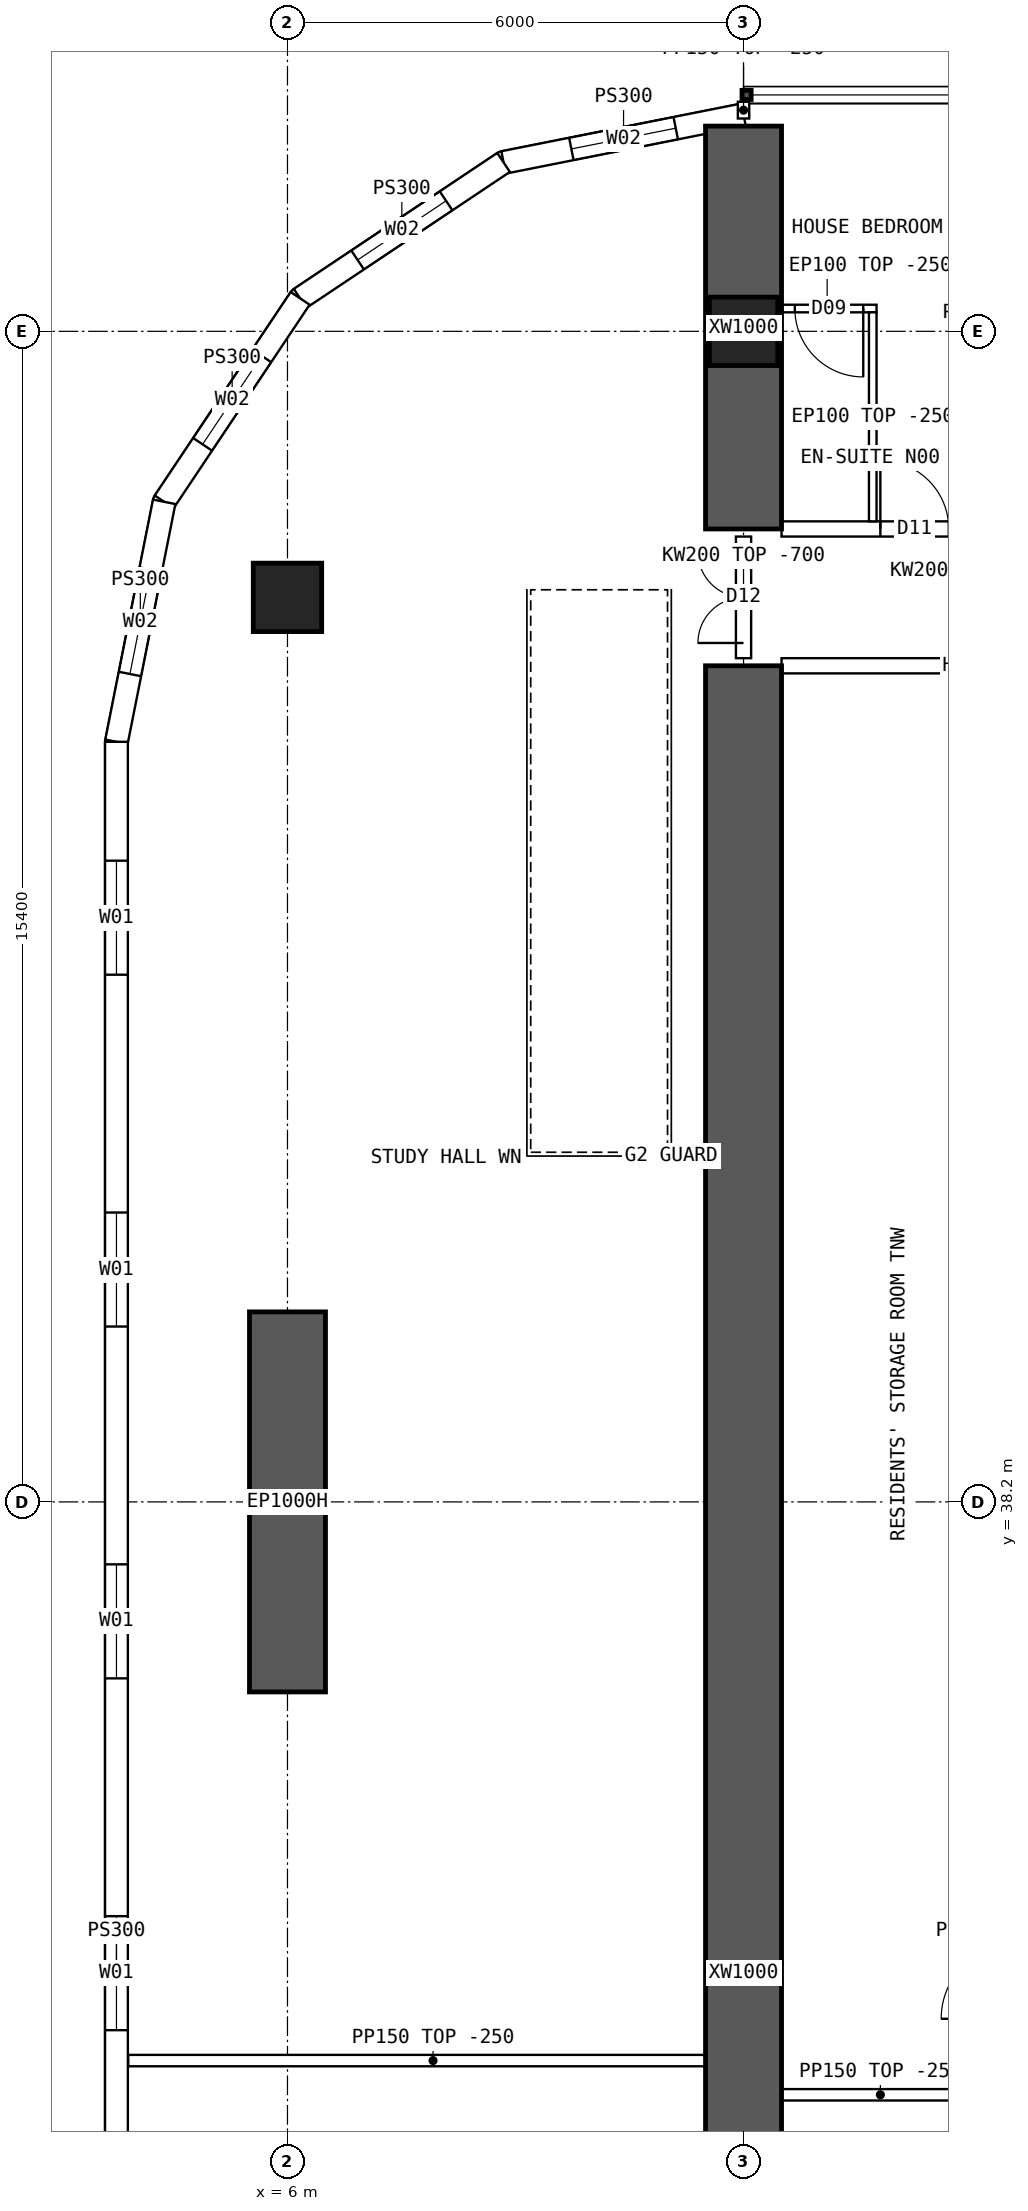
"""IFC4 building model, lengths in metres.
Left out: names, types, materials, properties, quantities, classifications, styles, units other than length and angle.
Written with IfcOpenShell. Run it as: python <this file> out.ifc"""

import sys

from ifc_helpers import new_model, si_unit, direction, frame, frame_2d, origin, origin_2d, place, context, subcontext, project, spatial, polyline, rectangle, hollow_rectangle, outline, extrude, element, fill, save


model = new_model("IFC4")
c1 = context("Model", 3, precision=1e-05, world=origin(), true_north=direction((0.0, 1.0)))
c2 = subcontext(c1, "Body", "Model", "MODEL_VIEW")
j1 = project(units=[si_unit("LENGTHUNIT", "METRE"), si_unit("PLANEANGLEUNIT", "RADIAN")], contexts=[c1])
p1 = place(None, origin())
s1 = spatial("IfcSite", under=j1, at=p1, CompositionType="ELEMENT")
p2 = place(p1, origin())
s2 = spatial("IfcBuilding", under=s1, at=p2, CompositionType="ELEMENT")
p3 = place(p2, frame((0.0, 0.0, 42.7)))
s3 = spatial("IfcBuildingStorey", under=s2, at=p3, CompositionType="ELEMENT", Elevation=42.7)
for number, where, z_axis, x_axis in (
    (1, (12.0, 53.6, 0.0), (0.0, 0.0, 1.0), (1.0, 0.0, 0.0)),
    (2, (6.0, 50.1, 0.0), (0.0, 0.0, 1.0), (1.0, 0.0, 0.0)),
):
    element("IfcColumn", number, at=place(p3, frame(where, z_axis=z_axis, x_axis=x_axis)), inside=s3, PredefinedType="COLUMN", context=c2, shape_type="SweptSolid", body=[
        extrude(hollow_rectangle(XDim=0.9, YDim=0.9, WallThickness=0.09, at=origin_2d()), origin(), (0.0, 0.0, 1.0), 3.75),
    ])
p4 = place(p3, frame((6.0, 35.7, 0.0), z_axis=(0.0, 0.0, 1.0), x_axis=(0.0, 1.0, 0.0)))
e3 = element("IfcWall", 3, at=p4, inside=s3, PredefinedType="SHEAR", context=c2, shape_type="SweptSolid", body=[
    extrude(rectangle(XDim=5.0, YDim=1.0, at=frame_2d((2.5, 0.0))), origin(), (0.0, 0.0, 1.0), 3.75),
])
p5 = place(p3, frame((12.0, 51.0, 0.0), z_axis=(0.0, 0.0, 1.0), x_axis=(0.0, 1.0, 0.0)))
e4 = element("IfcWall", 4, at=p5, inside=s3, PredefinedType="SHEAR", context=c2, shape_type="SweptSolid", body=[
    extrude(rectangle(XDim=5.3, YDim=1.0, at=frame_2d((2.65, 0.0))), origin(), (0.0, 0.0, 1.0), 3.75),
])
p6 = place(p3, frame((12.0, 14.8, 0.0), z_axis=(0.0, 0.0, 1.0), x_axis=(0.0, 1.0, 0.0)))
e5 = element("IfcWall", 5, at=p6, inside=s3, PredefinedType="SHEAR", context=c2, shape_type="SweptSolid", body=[
    extrude(rectangle(XDim=34.4, YDim=1.0, at=frame_2d((17.2, 0.0))), origin(), (0.0, 0.0, 1.0), 3.75),
])
p7 = place(p3, frame((3.75, 48.2, 0.0), z_axis=(0.0, 0.0, 1.0), x_axis=(0.0, -1.0, 0.0)))
e6 = element("IfcWall", 6, at=p7, inside=s3, PredefinedType="SOLIDWALL", context=c2, shape_type="SweptSolid", body=[
    extrude(outline(polyline([(-0.015, -0.15), (32.415, -0.15), (32.385, 0.15), (0.015, 0.15), (-0.015, -0.15)])), origin(), (0.0, 0.0, 1.0), 3.5),
])
p8 = place(p7, frame((1.564, 0.0, 0.9)))
e7 = element("IfcOpeningElement", 7, at=p8, cuts=e6, PredefinedType="OPENING", context=c2, shape_type="SweptSolid", body=[
    extrude(rectangle(XDim=1.5, YDim=2.0, at=frame_2d((0.75, 1.0))), frame((0.0, 0.16, 0.0), z_axis=(0.0, -1.0, 0.0), x_axis=(1.0, 0.0, 0.0)), (0.0, 0.0, 1.0), 0.32),
])
p9 = place(p7, frame((6.193, 0.0, 0.9)))
e8 = element("IfcOpeningElement", 8, at=p9, cuts=e6, PredefinedType="OPENING", context=c2, shape_type="SweptSolid", body=[
    extrude(rectangle(XDim=1.5, YDim=2.0, at=frame_2d((0.75, 1.0))), frame((0.0, 0.16, 0.0), z_axis=(0.0, -1.0, 0.0), x_axis=(1.0, 0.0, 0.0)), (0.0, 0.0, 1.0), 0.32),
])
p10 = place(p7, frame((10.822, 0.0, 0.9)))
e9 = element("IfcOpeningElement", 9, at=p10, cuts=e6, PredefinedType="OPENING", context=c2, shape_type="SweptSolid", body=[
    extrude(rectangle(XDim=1.5, YDim=2.0, at=frame_2d((0.75, 1.0))), frame((0.0, 0.16, 0.0), z_axis=(0.0, -1.0, 0.0), x_axis=(1.0, 0.0, 0.0)), (0.0, 0.0, 1.0), 0.32),
])
p11 = place(p7, frame((15.45, 0.0, 0.9)))
e10 = element("IfcOpeningElement", 10, at=p11, cuts=e6, PredefinedType="OPENING", context=c2, shape_type="SweptSolid", body=[
    extrude(rectangle(XDim=1.5, YDim=2.0, at=frame_2d((0.75, 1.0))), frame((0.0, 0.16, 0.0), z_axis=(0.0, -1.0, 0.0), x_axis=(1.0, 0.0, 0.0)), (0.0, 0.0, 1.0), 0.32),
])
p12 = place(p7, frame((20.079, 0.0, 0.9)))
e11 = element("IfcOpeningElement", 11, at=p12, cuts=e6, PredefinedType="OPENING", context=c2, shape_type="SweptSolid", body=[
    extrude(rectangle(XDim=1.5, YDim=2.0, at=frame_2d((0.75, 1.0))), frame((0.0, 0.16, 0.0), z_axis=(0.0, -1.0, 0.0), x_axis=(1.0, 0.0, 0.0)), (0.0, 0.0, 1.0), 0.32),
])
p13 = place(p7, frame((24.707, 0.0, 0.9)))
e12 = element("IfcOpeningElement", 12, at=p13, cuts=e6, PredefinedType="OPENING", context=c2, shape_type="SweptSolid", body=[
    extrude(rectangle(XDim=1.5, YDim=2.0, at=frame_2d((0.75, 1.0))), frame((0.0, 0.16, 0.0), z_axis=(0.0, -1.0, 0.0), x_axis=(1.0, 0.0, 0.0)), (0.0, 0.0, 1.0), 0.32),
])
p14 = place(p7, frame((29.336, 0.0, 0.9)))
e13 = element("IfcOpeningElement", 13, at=p14, cuts=e6, PredefinedType="OPENING", context=c2, shape_type="SweptSolid", body=[
    extrude(rectangle(XDim=1.5, YDim=2.0, at=frame_2d((0.75, 1.0))), frame((0.0, 0.16, 0.0), z_axis=(0.0, -1.0, 0.0), x_axis=(1.0, 0.0, 0.0)), (0.0, 0.0, 1.0), 0.32),
])
p15 = place(p3, frame((12.0, 56.45, 0.0), z_axis=(0.0, 0.0, 1.0), x_axis=(-0.980787251524, -0.195080412259, 0.0)))
e14 = element("IfcWall", 14, at=p15, inside=s3, PredefinedType="SOLIDWALL", context=c2, shape_type="SweptSolid", body=[
    extrude(outline(polyline([(-0.03, -0.15), (3.249, -0.15), (3.189, 0.15), (0.03, 0.15), (-0.03, -0.15)])), origin(), (0.0, 0.0, 1.0), 3.5),
])
p16 = place(p15, frame((0.909, 0.0, 0.9)))
e15 = element("IfcOpeningElement", 15, at=p16, cuts=e14, PredefinedType="OPENING", context=c2, shape_type="SweptSolid", body=[
    extrude(rectangle(XDim=1.4, YDim=1.8, at=frame_2d((0.7, 0.9))), frame((0.0, 0.16, 0.0), z_axis=(0.0, -1.0, 0.0), x_axis=(1.0, 0.0, 0.0)), (0.0, 0.0, 1.0), 0.32),
])
p17 = place(p3, frame((8.843, 55.822, 0.0), z_axis=(0.0, 0.0, 1.0), x_axis=(-0.831478105043, -0.555557522525, 0.0)))
e16 = element("IfcWall", 16, at=p17, inside=s3, PredefinedType="SOLIDWALL", context=c2, shape_type="SweptSolid", body=[
    extrude(outline(polyline([(-0.03, -0.15), (3.249, -0.15), (3.189, 0.15), (0.03, 0.15), (-0.03, -0.15)])), origin(), (0.0, 0.0, 1.0), 3.5),
])
p18 = place(p17, frame((0.909, 0.0, 0.9)))
e17 = element("IfcOpeningElement", 17, at=p18, cuts=e16, PredefinedType="OPENING", context=c2, shape_type="SweptSolid", body=[
    extrude(rectangle(XDim=1.4, YDim=1.8, at=frame_2d((0.7, 0.9))), frame((0.0, 0.16, 0.0), z_axis=(0.0, -1.0, 0.0), x_axis=(1.0, 0.0, 0.0)), (0.0, 0.0, 1.0), 0.32),
])
p19 = place(p3, frame((6.167, 54.034, 0.0), z_axis=(0.0, 0.0, 1.0), x_axis=(-0.555609954424, -0.831443069936, 0.0)))
e18 = element("IfcWall", 18, at=p19, inside=s3, PredefinedType="SOLIDWALL", context=c2, shape_type="SweptSolid", body=[
    extrude(outline(polyline([(-0.03, -0.15), (3.249, -0.15), (3.189, 0.15), (0.03, 0.15), (-0.03, -0.15)])), origin(), (0.0, 0.0, 1.0), 3.5),
])
p20 = place(p19, frame((0.909, 0.0, 0.9)))
e19 = element("IfcOpeningElement", 19, at=p20, cuts=e18, PredefinedType="OPENING", context=c2, shape_type="SweptSolid", body=[
    extrude(rectangle(XDim=1.4, YDim=1.8, at=frame_2d((0.7, 0.9))), frame((0.0, 0.16, 0.0), z_axis=(0.0, -1.0, 0.0), x_axis=(1.0, 0.0, 0.0)), (0.0, 0.0, 1.0), 0.32),
])
p21 = place(p3, frame((4.378, 51.357, 0.0), z_axis=(0.0, 0.0, 1.0), x_axis=(-0.195065901187, -0.980790137692, 0.0)))
e20 = element("IfcWall", 20, at=p21, inside=s3, PredefinedType="SOLIDWALL", context=c2, shape_type="SweptSolid", body=[
    extrude(outline(polyline([(-0.03, -0.15), (3.234, -0.15), (3.204, 0.15), (0.03, 0.15), (-0.03, -0.15)])), origin(), (0.0, 0.0, 1.0), 3.5),
])
p22 = place(p21, frame((0.909, 0.0, 0.9)))
e21 = element("IfcOpeningElement", 21, at=p22, cuts=e20, PredefinedType="OPENING", context=c2, shape_type="SweptSolid", body=[
    extrude(rectangle(XDim=1.4, YDim=1.8, at=frame_2d((0.7, 0.9))), frame((0.0, 0.16, 0.0), z_axis=(0.0, -1.0, 0.0), x_axis=(1.0, 0.0, 0.0)), (0.0, 0.0, 1.0), 0.32),
])
p23 = place(p3, frame((12.5, 51.0, 0.0), z_axis=(0.0, 0.0, 1.0), x_axis=(1.0, 0.0, 0.0)))
e22 = element("IfcWall", 22, at=p23, inside=s3, PredefinedType="SOLIDWALL", context=c2, shape_type="SweptSolid", body=[
    extrude(outline(polyline([(0.0, 0.0), (5.0, 0.0), (5.0, 3.1), (0.0, 3.1), (0.0, 0.0)])), frame((0.0, 0.1, 0.0), z_axis=(0.0, -1.0, 0.0), x_axis=(1.0, 0.0, 0.0)), (0.0, 0.0, 1.0), 0.2),
])
p24 = place(p23, frame((1.3, 0.0, 0.0)))
e23 = element("IfcOpeningElement", 23, at=p24, cuts=e22, PredefinedType="OPENING", context=c2, shape_type="SweptSolid", body=[
    extrude(rectangle(XDim=0.9, YDim=2.1, at=frame_2d((0.45, 1.05))), frame((0.0, 0.11, 0.0), z_axis=(0.0, -1.0, 0.0), x_axis=(1.0, 0.0, 0.0)), (0.0, 0.0, 1.0), 0.22),
])
p25 = place(p23, frame((2.675, 0.0, 0.0)))
e24 = element("IfcOpeningElement", 24, at=p25, cuts=e22, PredefinedType="OPENING", context=c2, shape_type="SweptSolid", body=[
    extrude(rectangle(XDim=0.9, YDim=2.1, at=frame_2d((0.45, 1.05))), frame((0.0, 0.11, 0.0), z_axis=(0.0, -1.0, 0.0), x_axis=(1.0, 0.0, 0.0)), (0.0, 0.0, 1.0), 0.22),
])
p26 = place(p3, frame((12.5, 49.2, 0.0), z_axis=(0.0, 0.0, 1.0), x_axis=(1.0, 0.0, 0.0)))
e25 = element("IfcWall", 25, at=p26, inside=s3, PredefinedType="SOLIDWALL", context=c2, shape_type="SweptSolid", body=[
    extrude(rectangle(XDim=5.0, YDim=0.2, at=frame_2d((2.5, 0.0))), origin(), (0.0, 0.0, 1.0), 3.5),
])
p27 = place(p26, frame((3.3, 0.0, 0.0)))
e26 = element("IfcOpeningElement", 26, at=p27, cuts=e25, PredefinedType="OPENING", context=c2, shape_type="SweptSolid", body=[
    extrude(rectangle(XDim=1.6, YDim=2.1, at=frame_2d((0.8, 1.05))), frame((0.0, 0.11, 0.0), z_axis=(0.0, -1.0, 0.0), x_axis=(1.0, 0.0, 0.0)), (0.0, 0.0, 1.0), 0.22),
])
p28 = place(p3, frame((12.45, 53.9, 0.0), z_axis=(0.0, 0.0, 1.0), x_axis=(1.0, 0.0, 0.0)))
e27 = element("IfcWall", 27, at=p28, inside=s3, PredefinedType="PARTITIONING", context=c2, shape_type="SweptSolid", body=[
    extrude(rectangle(XDim=1.3, YDim=0.1, at=frame_2d((0.65, 0.0))), origin(), (0.0, 0.0, 1.0), 3.5),
])
p29 = place(p28, frame((0.225, 0.0, 0.0)))
e28 = element("IfcOpeningElement", 28, at=p29, cuts=e27, PredefinedType="OPENING", context=c2, shape_type="SweptSolid", body=[
    extrude(rectangle(XDim=0.9, YDim=2.1, at=frame_2d((0.45, 1.05))), frame((0.0, 0.06, 0.0), z_axis=(0.0, -1.0, 0.0), x_axis=(1.0, 0.0, 0.0)), (0.0, 0.0, 1.0), 0.12),
])
p30 = place(p3, frame((13.7, 53.85, 0.0), z_axis=(0.0, 0.0, 1.0), x_axis=(0.0, -1.0, 0.0)))
e29 = element("IfcWall", 29, at=p30, inside=s3, PredefinedType="PARTITIONING", context=c2, shape_type="SweptSolid", body=[
    extrude(outline(polyline([(0.0, 0.0), (2.75, 0.0), (2.75, 3.1), (2.702, 3.1), (2.7, 3.5), (0.452, 3.5), (0.45, 3.1), (0.0, 3.1), (0.0, 0.0)])), frame((0.0, 0.05, 0.0), z_axis=(0.0, -1.0, 0.0), x_axis=(1.0, 0.0, 0.0)), (0.0, 0.0, 1.0), 0.1),
])
p31 = place(p3, frame((12.0, 30.4, 0.0), z_axis=(0.0, 0.0, 1.0), x_axis=(1.0, 0.0, 0.0)))
e30 = element("IfcWall", 30, at=p31, inside=s3, PredefinedType="PARTITIONING", context=c2, shape_type="SweptSolid", body=[
    extrude(rectangle(XDim=3.6, YDim=0.15, at=frame_2d((1.8, 0.0))), origin(), (0.0, 0.0, 1.0), 3.5),
])
p32 = place(p3, frame((3.905, 30.85, 0.0), z_axis=(0.0, 0.0, 1.0), x_axis=(1.0, 0.0, 0.0)))
e31 = element("IfcWall", 31, at=p32, inside=s3, PredefinedType="PARTITIONING", context=c2, shape_type="SweptSolid", body=[
    extrude(outline(polyline([(0.0, 0.0), (8.02, 0.0), (8.02, 3.5), (2.397, 3.5), (2.395, 3.05), (1.797, 3.05), (1.795, 3.5), (0.0, 3.5), (0.0, 0.0)])), frame((0.0, 0.075, 0.0), z_axis=(0.0, -1.0, 0.0), x_axis=(1.0, 0.0, 0.0)), (0.0, 0.0, 1.0), 0.15),
])
p33 = place(p3, frame((12.0, 49.3, 0.0), z_axis=(0.0, 0.0, 1.0), x_axis=(0.0, 1.0, 0.0)))
e32 = element("IfcWall", 32, at=p33, inside=s3, PredefinedType="SOLIDWALL", context=c2, shape_type="SweptSolid", body=[
    extrude(outline(polyline([(0.0, 0.0), (1.6, 0.0), (1.6, 3.05), (0.0, 3.05), (0.0, 0.0)])), frame((0.0, 0.1, 0.0), z_axis=(0.0, -1.0, 0.0), x_axis=(1.0, 0.0, 0.0)), (0.0, 0.0, 1.0), 0.2),
])
p34 = place(p33, frame((0.2, 0.0, 0.0)))
e33 = element("IfcOpeningElement", 33, at=p34, cuts=e32, PredefinedType="OPENING", context=c2, shape_type="SweptSolid", body=[
    extrude(rectangle(XDim=1.2, YDim=2.1, at=frame_2d((0.6, 1.05))), frame((0.0, 0.11, 0.0), z_axis=(0.0, -1.0, 0.0), x_axis=(1.0, 0.0, 0.0)), (0.0, 0.0, 1.0), 0.22),
])
p35 = place(p3, frame((12.0, 56.4, 0.0), z_axis=(0.0, 0.0, 1.0), x_axis=(0.0, 1.0, 0.0)))
e34 = element("IfcWall", 34, at=p35, inside=s3, PredefinedType="PARTITIONING", context=c2, shape_type="SweptSolid", body=[
    extrude(rectangle(XDim=0.22, YDim=0.15, at=frame_2d((0.11, 0.0))), origin(), (0.0, 0.0, 1.0), 3.5),
])
p36 = place(p8, origin())
e35 = element("IfcWindow", 35, at=p36, inside=s3, PartitioningType="SINGLE_PANEL", PredefinedType="WINDOW", context=c2, shape_type="SweptSolid", body=[
    extrude(rectangle(XDim=1.5, YDim=2.0, at=frame_2d((0.75, 1.0))), frame((0.0, 0.03, 0.0), z_axis=(0.0, -1.0, 0.0), x_axis=(1.0, 0.0, 0.0)), (0.0, 0.0, 1.0), 0.06),
])
fill(e7, e35)
p37 = place(p9, origin())
e36 = element("IfcWindow", 36, at=p37, inside=s3, PartitioningType="SINGLE_PANEL", PredefinedType="WINDOW", context=c2, shape_type="SweptSolid", body=[
    extrude(rectangle(XDim=1.5, YDim=2.0, at=frame_2d((0.75, 1.0))), frame((0.0, 0.03, 0.0), z_axis=(0.0, -1.0, 0.0), x_axis=(1.0, 0.0, 0.0)), (0.0, 0.0, 1.0), 0.06),
])
fill(e8, e36)
p38 = place(p10, origin())
e37 = element("IfcWindow", 37, at=p38, inside=s3, PartitioningType="SINGLE_PANEL", PredefinedType="WINDOW", context=c2, shape_type="SweptSolid", body=[
    extrude(rectangle(XDim=1.5, YDim=2.0, at=frame_2d((0.75, 1.0))), frame((0.0, 0.03, 0.0), z_axis=(0.0, -1.0, 0.0), x_axis=(1.0, 0.0, 0.0)), (0.0, 0.0, 1.0), 0.06),
])
fill(e9, e37)
p39 = place(p11, origin())
e38 = element("IfcWindow", 38, at=p39, inside=s3, PartitioningType="SINGLE_PANEL", PredefinedType="WINDOW", context=c2, shape_type="SweptSolid", body=[
    extrude(rectangle(XDim=1.5, YDim=2.0, at=frame_2d((0.75, 1.0))), frame((0.0, 0.03, 0.0), z_axis=(0.0, -1.0, 0.0), x_axis=(1.0, 0.0, 0.0)), (0.0, 0.0, 1.0), 0.06),
])
fill(e10, e38)
p40 = place(p16, origin())
e39 = element("IfcWindow", 39, at=p40, inside=s3, PartitioningType="SINGLE_PANEL", PredefinedType="WINDOW", context=c2, shape_type="SweptSolid", body=[
    extrude(rectangle(XDim=1.4, YDim=1.8, at=frame_2d((0.7, 0.9))), frame((0.0, 0.03, 0.0), z_axis=(0.0, -1.0, 0.0), x_axis=(1.0, 0.0, 0.0)), (0.0, 0.0, 1.0), 0.06),
])
fill(e15, e39)
p41 = place(p18, origin())
e40 = element("IfcWindow", 40, at=p41, inside=s3, PartitioningType="SINGLE_PANEL", PredefinedType="WINDOW", context=c2, shape_type="SweptSolid", body=[
    extrude(rectangle(XDim=1.4, YDim=1.8, at=frame_2d((0.7, 0.9))), frame((0.0, 0.03, 0.0), z_axis=(0.0, -1.0, 0.0), x_axis=(1.0, 0.0, 0.0)), (0.0, 0.0, 1.0), 0.06),
])
fill(e17, e40)
p42 = place(p20, origin())
e41 = element("IfcWindow", 41, at=p42, inside=s3, PartitioningType="SINGLE_PANEL", PredefinedType="WINDOW", context=c2, shape_type="SweptSolid", body=[
    extrude(rectangle(XDim=1.4, YDim=1.8, at=frame_2d((0.7, 0.9))), frame((0.0, 0.03, 0.0), z_axis=(0.0, -1.0, 0.0), x_axis=(1.0, 0.0, 0.0)), (0.0, 0.0, 1.0), 0.06),
])
fill(e19, e41)
p43 = place(p22, origin())
e42 = element("IfcWindow", 42, at=p43, inside=s3, PartitioningType="SINGLE_PANEL", PredefinedType="WINDOW", context=c2, shape_type="SweptSolid", body=[
    extrude(rectangle(XDim=1.4, YDim=1.8, at=frame_2d((0.7, 0.9))), frame((0.0, 0.03, 0.0), z_axis=(0.0, -1.0, 0.0), x_axis=(1.0, 0.0, 0.0)), (0.0, 0.0, 1.0), 0.06),
])
fill(e21, e42)
p44 = place(p29, origin())
e43 = element("IfcDoor", 43, at=p44, inside=s3, OperationType="SINGLE_SWING_RIGHT", PredefinedType="DOOR", context=c2, shape_type="SweptSolid", body=[
    extrude(rectangle(XDim=0.9, YDim=2.1, at=frame_2d((0.45, 1.05))), frame((0.0, 0.025, 0.0), z_axis=(0.0, -1.0, 0.0), x_axis=(1.0, 0.0, 0.0)), (0.0, 0.0, 1.0), 0.05),
])
fill(e28, e43)
p45 = place(p24, origin())
e44 = element("IfcDoor", 44, at=p45, inside=s3, OperationType="SINGLE_SWING_LEFT", PredefinedType="DOOR", context=c2, shape_type="SweptSolid", body=[
    extrude(rectangle(XDim=0.9, YDim=2.1, at=frame_2d((0.45, 1.05))), frame((0.0, 0.025, 0.0), z_axis=(0.0, -1.0, 0.0), x_axis=(1.0, 0.0, 0.0)), (0.0, 0.0, 1.0), 0.05),
])
fill(e23, e44)
p46 = place(p34, origin())
e45 = element("IfcDoor", 45, at=p46, inside=s3, OperationType="DOUBLE_DOOR_SINGLE_SWING", PredefinedType="DOOR", context=c2, shape_type="SweptSolid", body=[
    extrude(rectangle(XDim=1.2, YDim=2.1, at=frame_2d((0.6, 1.05))), frame((0.0, 0.025, 0.0), z_axis=(0.0, -1.0, 0.0), x_axis=(1.0, 0.0, 0.0)), (0.0, 0.0, 1.0), 0.05),
])
fill(e33, e45)
save(model, sys.argv[1])
